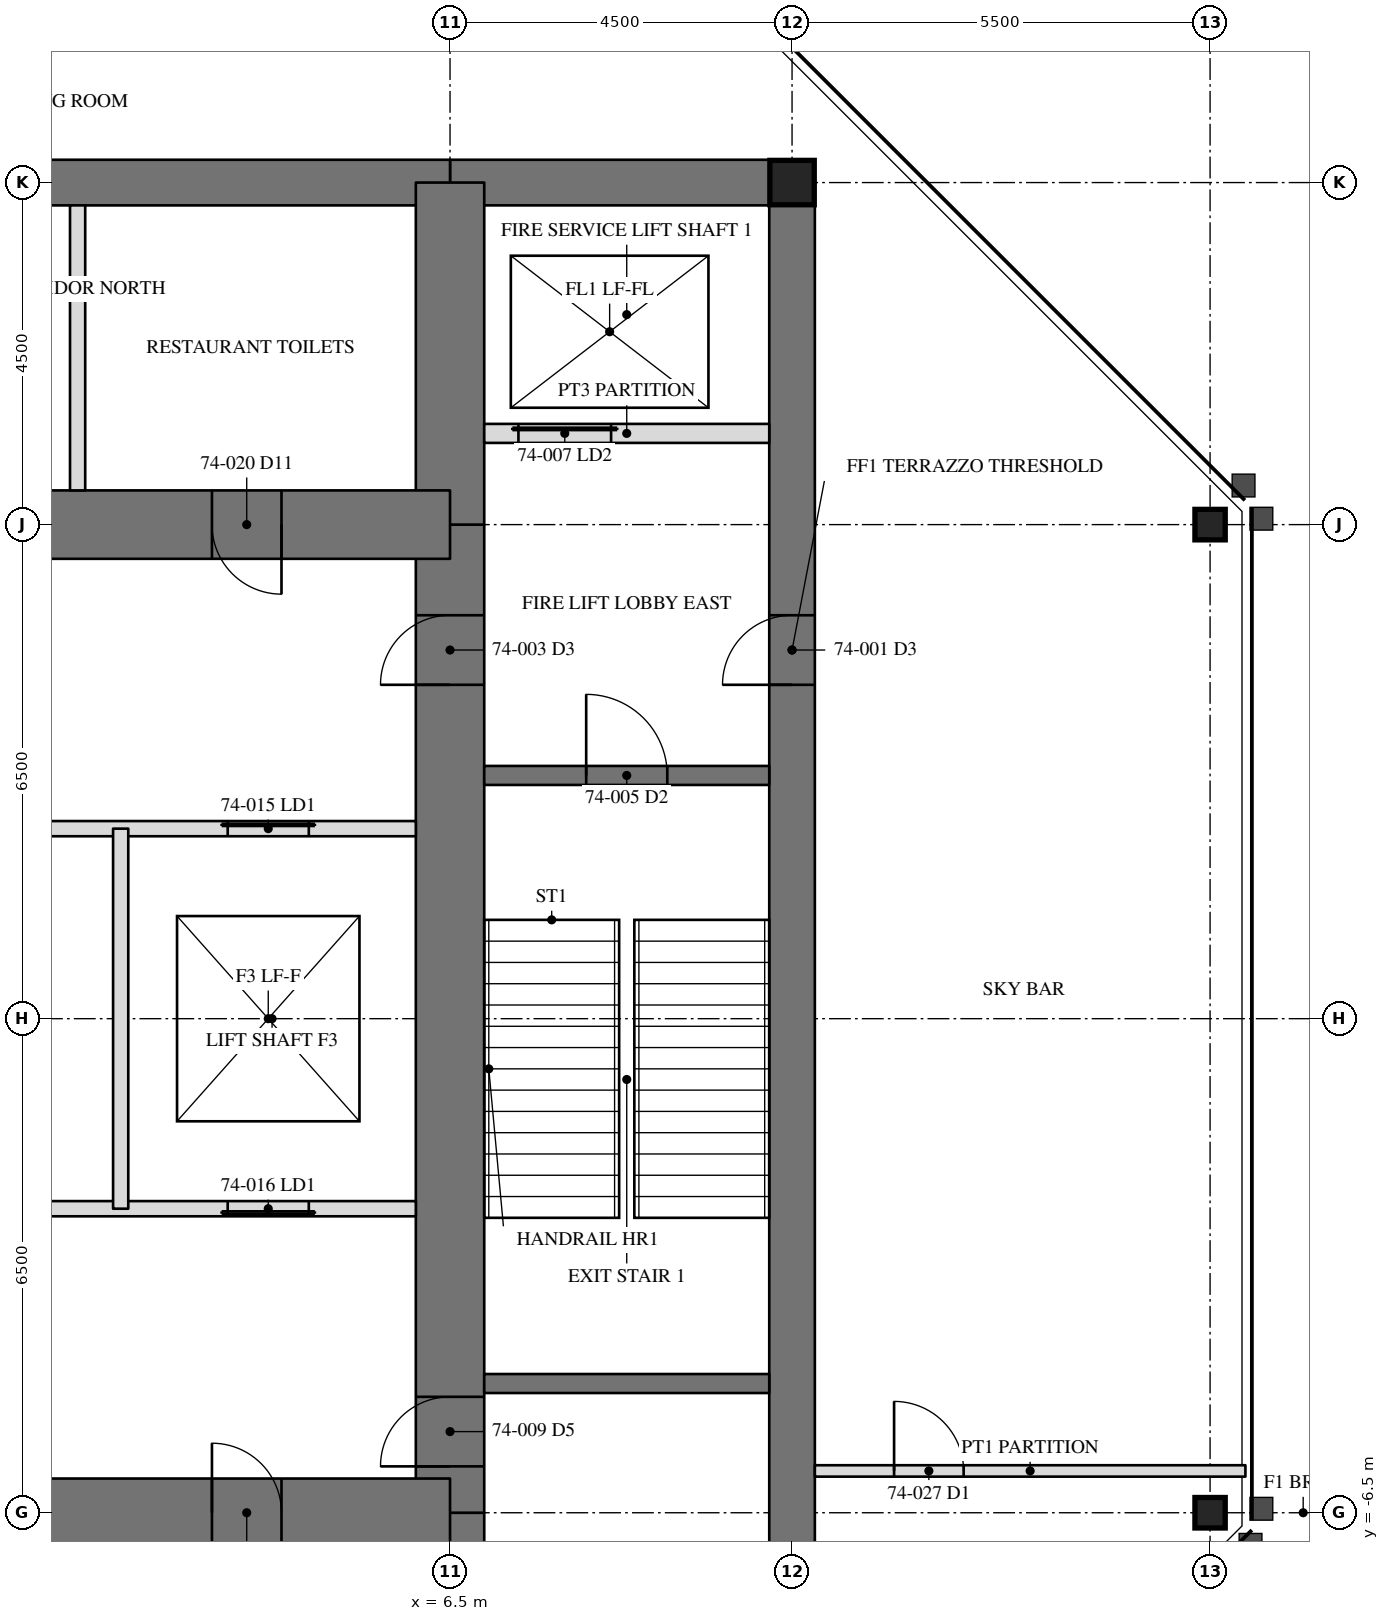
"""IFC4 building model, lengths in metres.
Left out: names, types, materials, properties, quantities, classifications, styles, units other than length and angle.
Written with IfcOpenShell. Run it as: python <this file> out.ifc"""

import sys

from ifc_helpers import new_model, si_unit, direction, frame, frame_2d, origin, origin_2d, place, context, subcontext, project, spatial, rectangle, hollow_rectangle, i_section, extrude, element, fill, save


model = new_model("IFC4")
c1 = context("Model", 3, precision=1e-05, world=origin(), true_north=direction((0.0, 1.0)))
c2 = subcontext(c1, "Body", "Model", "MODEL_VIEW")
j1 = project(units=[si_unit("LENGTHUNIT", "METRE"), si_unit("PLANEANGLEUNIT", "RADIAN")], contexts=[c1])
p1 = place(None, origin())
s1 = spatial("IfcSite", under=j1, at=p1, CompositionType="ELEMENT")
p2 = place(p1, origin())
s2 = spatial("IfcBuilding", under=s1, at=p2, CompositionType="ELEMENT")
p3 = place(p2, frame((0.0, 0.0, 299.2)))
s3 = spatial("IfcBuildingStorey", under=s2, at=p3, CompositionType="ELEMENT", Elevation=299.2)
for number, where, z_axis, x_axis in (
    (1, (16.5, -6.5, 0.0), (0.0, 0.0, 1.0), (0.0, 1.0, 0.0)),
    (2, (16.5, 6.5, 0.0), (0.0, 0.0, 1.0), (0.0, 1.0, 0.0)),
):
    element("IfcColumn", number, at=place(p3, frame(where, z_axis=z_axis, x_axis=x_axis)), inside=s3, PredefinedType="COLUMN", context=c2, shape_type="SweptSolid", body=[
        extrude(i_section(OverallWidth=0.401, OverallDepth=0.399, WebThickness=0.025, FlangeThickness=0.04, at=origin_2d()), origin(), (0.0, 0.0, 1.0), 5.0),
    ])
p4 = place(p3, frame((11.0, -11.0, 0.0), z_axis=(0.0, 0.0, 1.0), x_axis=(0.0, 1.0, 0.0)))
e3 = element("IfcWall", 3, at=p4, inside=s3, PredefinedType="SHEAR", context=c2, shape_type="SweptSolid", body=[
    extrude(rectangle(XDim=22.0, YDim=0.6, at=frame_2d((11.0, 0.0))), origin(), (0.0, 0.0, 1.0), 5.0),
])
p5 = place(p4, frame((15.393, 0.0, 0.0)))
e4 = element("IfcOpeningElement", 4, at=p5, cuts=e3, PredefinedType="OPENING", context=c2, shape_type="SweptSolid", body=[
    extrude(rectangle(XDim=0.915, YDim=2.134, at=frame_2d((0.458, 1.067))), frame((0.0, 0.31, 0.0), z_axis=(0.0, -1.0, 0.0), x_axis=(1.0, 0.0, 0.0)), (0.0, 0.0, 1.0), 0.62),
])
p6 = place(p3, frame((11.0, 11.0, 0.0), z_axis=(0.0, 0.0, 1.0), x_axis=(-1.0, 0.0, 0.0)))
e5 = element("IfcWall", 5, at=p6, inside=s3, PredefinedType="SHEAR", context=c2, shape_type="SweptSolid", body=[
    extrude(rectangle(XDim=4.5, YDim=0.6, at=frame_2d((2.25, 0.0))), origin(), (0.0, 0.0, 1.0), 5.0),
])
p7 = place(p3, frame((6.5, 11.0, 0.0), z_axis=(0.0, 0.0, 1.0), x_axis=(-1.0, 0.0, 0.0)))
e6 = element("IfcWall", 6, at=p7, inside=s3, PredefinedType="SHEAR", context=c2, shape_type="SweptSolid", body=[
    extrude(rectangle(XDim=13.0, YDim=0.6, at=frame_2d((6.5, 0.0))), origin(), (0.0, 0.0, 1.0), 5.0),
])
p8 = place(p7, frame((6.042, 0.0, 0.0)))
e7 = element("IfcOpeningElement", 7, at=p8, cuts=e6, PredefinedType="OPENING", context=c2, shape_type="SweptSolid", body=[
    extrude(rectangle(XDim=0.915, YDim=2.134, at=frame_2d((0.458, 1.067))), frame((0.0, 0.31, 0.0), z_axis=(0.0, -1.0, 0.0), x_axis=(1.0, 0.0, 0.0)), (0.0, 0.0, 1.0), 0.62),
])
p9 = place(p3, frame((6.5, -11.0, 0.0), z_axis=(0.0, 0.0, 1.0), x_axis=(0.0, 1.0, 0.0)))
e8 = element("IfcWall", 8, at=p9, inside=s3, PredefinedType="SHEAR", context=c2, shape_type="SweptSolid", body=[
    extrude(rectangle(XDim=4.5, YDim=0.9, at=frame_2d((2.25, 0.0))), origin(), (0.0, 0.0, 1.0), 5.0),
])
p10 = place(p3, frame((6.5, -6.5, 0.0), z_axis=(0.0, 0.0, 1.0), x_axis=(0.0, 1.0, 0.0)))
e9 = element("IfcWall", 9, at=p10, inside=s3, PredefinedType="SHEAR", context=c2, shape_type="SweptSolid", body=[
    extrude(rectangle(XDim=13.0, YDim=0.9, at=frame_2d((6.5, 0.0))), origin(), (0.0, 0.0, 1.0), 5.0),
])
p11 = place(p10, frame((10.893, 0.0, 0.0)))
e10 = element("IfcOpeningElement", 10, at=p11, cuts=e9, PredefinedType="OPENING", context=c2, shape_type="SweptSolid", body=[
    extrude(rectangle(XDim=0.915, YDim=2.134, at=frame_2d((0.458, 1.067))), frame((0.0, 0.46, 0.0), z_axis=(0.0, -1.0, 0.0), x_axis=(1.0, 0.0, 0.0)), (0.0, 0.0, 1.0), 0.92),
])
p12 = place(p10, frame((0.61, 0.0, 0.0)))
e11 = element("IfcOpeningElement", 11, at=p12, cuts=e9, PredefinedType="OPENING", context=c2, shape_type="SweptSolid", body=[
    extrude(rectangle(XDim=0.915, YDim=2.134, at=frame_2d((0.458, 1.067))), frame((0.0, 0.46, 0.0), z_axis=(0.0, -1.0, 0.0), x_axis=(1.0, 0.0, 0.0)), (0.0, 0.0, 1.0), 0.92),
])
p13 = place(p3, frame((6.5, 6.5, 0.0), z_axis=(0.0, 0.0, 1.0), x_axis=(0.0, 1.0, 0.0)))
e12 = element("IfcWall", 12, at=p13, inside=s3, PredefinedType="SHEAR", context=c2, shape_type="SweptSolid", body=[
    extrude(rectangle(XDim=4.5, YDim=0.9, at=frame_2d((2.25, 0.0))), origin(), (0.0, 0.0, 1.0), 5.0),
])
p14 = place(p3, frame((6.5, 6.5, 0.0), z_axis=(0.0, 0.0, 1.0), x_axis=(-1.0, 0.0, 0.0)))
e13 = element("IfcWall", 13, at=p14, inside=s3, PredefinedType="SHEAR", context=c2, shape_type="SweptSolid", body=[
    extrude(rectangle(XDim=13.0, YDim=0.9, at=frame_2d((6.5, 0.0))), origin(), (0.0, 0.0, 1.0), 5.0),
])
p15 = place(p14, frame((6.042, 0.0, 0.0)))
e14 = element("IfcOpeningElement", 14, at=p15, cuts=e13, PredefinedType="OPENING", context=c2, shape_type="SweptSolid", body=[
    extrude(rectangle(XDim=0.915, YDim=2.134, at=frame_2d((0.458, 1.067))), frame((0.0, 0.46, 0.0), z_axis=(0.0, -1.0, 0.0), x_axis=(1.0, 0.0, 0.0)), (0.0, 0.0, 1.0), 0.92),
])
p16 = place(p14, frame((9.867, 0.0, 0.0)))
e15 = element("IfcOpeningElement", 15, at=p16, cuts=e13, PredefinedType="OPENING", context=c2, shape_type="SweptSolid", body=[
    extrude(rectangle(XDim=0.915, YDim=2.134, at=frame_2d((0.458, 1.067))), frame((0.0, 0.46, 0.0), z_axis=(0.0, -1.0, 0.0), x_axis=(1.0, 0.0, 0.0)), (0.0, 0.0, 1.0), 0.92),
])
p17 = place(p14, frame((2.218, 0.0, 0.0)))
e16 = element("IfcOpeningElement", 16, at=p17, cuts=e13, PredefinedType="OPENING", context=c2, shape_type="SweptSolid", body=[
    extrude(rectangle(XDim=0.915, YDim=2.134, at=frame_2d((0.458, 1.067))), frame((0.0, 0.46, 0.0), z_axis=(0.0, -1.0, 0.0), x_axis=(1.0, 0.0, 0.0)), (0.0, 0.0, 1.0), 0.92),
])
p18 = place(p3, frame((-6.5, -6.5, 0.0), z_axis=(0.0, 0.0, 1.0), x_axis=(1.0, 0.0, 0.0)))
e17 = element("IfcWall", 17, at=p18, inside=s3, PredefinedType="SHEAR", context=c2, shape_type="SweptSolid", body=[
    extrude(rectangle(XDim=13.0, YDim=0.9, at=frame_2d((6.5, 0.0))), origin(), (0.0, 0.0, 1.0), 5.0),
])
p19 = place(p18, frame((6.042, 0.0, 0.0)))
e18 = element("IfcOpeningElement", 18, at=p19, cuts=e17, PredefinedType="OPENING", context=c2, shape_type="SweptSolid", body=[
    extrude(rectangle(XDim=0.915, YDim=2.134, at=frame_2d((0.458, 1.067))), frame((0.0, 0.46, 0.0), z_axis=(0.0, -1.0, 0.0), x_axis=(1.0, 0.0, 0.0)), (0.0, 0.0, 1.0), 0.92),
])
p20 = place(p18, frame((2.218, 0.0, 0.0)))
e19 = element("IfcOpeningElement", 19, at=p20, cuts=e17, PredefinedType="OPENING", context=c2, shape_type="SweptSolid", body=[
    extrude(rectangle(XDim=0.915, YDim=2.134, at=frame_2d((0.458, 1.067))), frame((0.0, 0.46, 0.0), z_axis=(0.0, -1.0, 0.0), x_axis=(1.0, 0.0, 0.0)), (0.0, 0.0, 1.0), 0.92),
])
p21 = place(p18, frame((9.867, 0.0, 0.0)))
e20 = element("IfcOpeningElement", 20, at=p21, cuts=e17, PredefinedType="OPENING", context=c2, shape_type="SweptSolid", body=[
    extrude(rectangle(XDim=0.915, YDim=2.134, at=frame_2d((0.458, 1.067))), frame((0.0, 0.46, 0.0), z_axis=(0.0, -1.0, 0.0), x_axis=(1.0, 0.0, 0.0)), (0.0, 0.0, 1.0), 0.92),
])
p22 = place(p3, frame((11.0, 11.0, 0.0), z_axis=(0.0, 0.0, 1.0), x_axis=(1.0, 0.0, 0.0)))
e21 = element("IfcColumn", 21, at=p22, inside=s3, PredefinedType="COLUMN", context=c2, shape_type="SweptSolid", body=[
    extrude(hollow_rectangle(XDim=0.584, YDim=0.584, WallThickness=0.051, at=origin_2d()), origin(), (0.0, 0.0, 1.0), 5.0),
])
p23 = place(p3, frame((6.95, -4.8, 0.0), z_axis=(0.0, 0.0, 1.0), x_axis=(1.0, 0.0, 0.0)))
e22 = element("IfcWall", 22, at=p23, inside=s3, PredefinedType="SOLIDWALL", context=c2, shape_type="SweptSolid", body=[
    extrude(rectangle(XDim=3.75, YDim=0.25, at=frame_2d((1.875, 0.0))), origin(), (0.0, 0.0, 1.0), 4.81),
])
p24 = place(p3, frame((6.95, 3.2, 0.0), z_axis=(0.0, 0.0, 1.0), x_axis=(1.0, 0.0, 0.0)))
e23 = element("IfcWall", 23, at=p24, inside=s3, PredefinedType="SOLIDWALL", context=c2, shape_type="SweptSolid", body=[
    extrude(rectangle(XDim=3.75, YDim=0.25, at=frame_2d((1.875, 0.0))), origin(), (0.0, 0.0, 1.0), 4.81),
])
p25 = place(p24, frame((1.342, 0.0, 0.0)))
e24 = element("IfcOpeningElement", 24, at=p25, cuts=e23, PredefinedType="OPENING", context=c2, shape_type="SweptSolid", body=[
    extrude(rectangle(XDim=1.067, YDim=2.134, at=frame_2d((0.533, 1.067))), frame((0.0, 0.135, 0.0), z_axis=(0.0, -1.0, 0.0), x_axis=(1.0, 0.0, 0.0)), (0.0, 0.0, 1.0), 0.27),
])
p26 = place(p3, frame((6.95, 7.7, 0.0), z_axis=(0.0, 0.0, 1.0), x_axis=(1.0, 0.0, 0.0)))
e25 = element("IfcWall", 25, at=p26, inside=s3, PredefinedType="PARTITIONING", context=c2, shape_type="SweptSolid", body=[
    extrude(rectangle(XDim=3.75, YDim=0.25, at=frame_2d((1.875, 0.0))), origin(), (0.0, 0.0, 1.0), 4.81),
])
p27 = place(p26, frame((0.45, 0.0, 0.0)))
e26 = element("IfcOpeningElement", 26, at=p27, cuts=e25, PredefinedType="OPENING", context=c2, shape_type="SweptSolid", body=[
    extrude(rectangle(XDim=1.219, YDim=2.134, at=frame_2d((0.609, 1.067))), frame((0.0, 0.135, 0.0), z_axis=(0.0, -1.0, 0.0), x_axis=(1.0, 0.0, 0.0)), (0.0, 0.0, 1.0), 0.27),
])
p28 = place(p3, frame((-6.05, 2.5, 0.0), z_axis=(0.0, 0.0, 1.0), x_axis=(1.0, 0.0, 0.0)))
e27 = element("IfcWall", 27, at=p28, inside=s3, PredefinedType="PARTITIONING", context=c2, shape_type="SweptSolid", body=[
    extrude(rectangle(XDim=12.1, YDim=0.2, at=frame_2d((6.05, 0.0))), origin(), (0.0, 0.0, 1.0), 4.81),
])
p29 = place(p28, frame((1.408, 0.0, 0.0)))
e28 = element("IfcOpeningElement", 28, at=p29, cuts=e27, PredefinedType="OPENING", context=c2, shape_type="SweptSolid", body=[
    extrude(rectangle(XDim=1.067, YDim=2.134, at=frame_2d((0.533, 1.067))), frame((0.0, 0.11, 0.0), z_axis=(0.0, -1.0, 0.0), x_axis=(1.0, 0.0, 0.0)), (0.0, 0.0, 1.0), 0.22),
])
p30 = place(p28, frame((5.517, 0.0, 0.0)))
e29 = element("IfcOpeningElement", 29, at=p30, cuts=e27, PredefinedType="OPENING", context=c2, shape_type="SweptSolid", body=[
    extrude(rectangle(XDim=1.067, YDim=2.134, at=frame_2d((0.533, 1.067))), frame((0.0, 0.11, 0.0), z_axis=(0.0, -1.0, 0.0), x_axis=(1.0, 0.0, 0.0)), (0.0, 0.0, 1.0), 0.22),
])
p31 = place(p28, frame((9.625, 0.0, 0.0)))
e30 = element("IfcOpeningElement", 30, at=p31, cuts=e27, PredefinedType="OPENING", context=c2, shape_type="SweptSolid", body=[
    extrude(rectangle(XDim=1.067, YDim=2.134, at=frame_2d((0.533, 1.067))), frame((0.0, 0.11, 0.0), z_axis=(0.0, -1.0, 0.0), x_axis=(1.0, 0.0, 0.0)), (0.0, 0.0, 1.0), 0.22),
])
p32 = place(p3, frame((6.05, -2.5, 0.0), z_axis=(0.0, 0.0, 1.0), x_axis=(-1.0, 0.0, 0.0)))
e31 = element("IfcWall", 31, at=p32, inside=s3, PredefinedType="PARTITIONING", context=c2, shape_type="SweptSolid", body=[
    extrude(rectangle(XDim=12.1, YDim=0.2, at=frame_2d((6.05, 0.0))), origin(), (0.0, 0.0, 1.0), 4.81),
])
p33 = place(p32, frame((9.625, 0.0, 0.0)))
e32 = element("IfcOpeningElement", 32, at=p33, cuts=e31, PredefinedType="OPENING", context=c2, shape_type="SweptSolid", body=[
    extrude(rectangle(XDim=1.067, YDim=2.134, at=frame_2d((0.533, 1.067))), frame((0.0, 0.11, 0.0), z_axis=(0.0, -1.0, 0.0), x_axis=(1.0, 0.0, 0.0)), (0.0, 0.0, 1.0), 0.22),
])
p34 = place(p32, frame((5.517, 0.0, 0.0)))
e33 = element("IfcOpeningElement", 33, at=p34, cuts=e31, PredefinedType="OPENING", context=c2, shape_type="SweptSolid", body=[
    extrude(rectangle(XDim=1.067, YDim=2.134, at=frame_2d((0.533, 1.067))), frame((0.0, 0.11, 0.0), z_axis=(0.0, -1.0, 0.0), x_axis=(1.0, 0.0, 0.0)), (0.0, 0.0, 1.0), 0.22),
])
p35 = place(p32, frame((1.408, 0.0, 0.0)))
e34 = element("IfcOpeningElement", 34, at=p35, cuts=e31, PredefinedType="OPENING", context=c2, shape_type="SweptSolid", body=[
    extrude(rectangle(XDim=1.067, YDim=2.134, at=frame_2d((0.533, 1.067))), frame((0.0, 0.11, 0.0), z_axis=(0.0, -1.0, 0.0), x_axis=(1.0, 0.0, 0.0)), (0.0, 0.0, 1.0), 0.22),
])
p36 = place(p3, frame((2.167, -2.5, 0.0), z_axis=(0.0, 0.0, 1.0), x_axis=(0.0, 1.0, 0.0)))
e35 = element("IfcWall", 35, at=p36, inside=s3, PredefinedType="PARTITIONING", context=c2, shape_type="SweptSolid", body=[
    extrude(rectangle(XDim=5.0, YDim=0.2, at=frame_2d((2.5, 0.0))), origin(), (0.0, 0.0, 1.0), 4.81),
])
p37 = place(p3, frame((1.6, 6.95, 0.0), z_axis=(0.0, 0.0, 1.0), x_axis=(0.0, 1.0, 0.0)))
e36 = element("IfcWall", 36, at=p37, inside=s3, PredefinedType="PARTITIONING", context=c2, shape_type="SweptSolid", body=[
    extrude(rectangle(XDim=3.75, YDim=0.2, at=frame_2d((1.875, 0.0))), origin(), (0.0, 0.0, 1.0), 4.81),
])
p38 = place(p3, frame((11.3, -5.95, 0.0), z_axis=(0.0, 0.0, 1.0), x_axis=(1.0, 0.0, 0.0)))
e37 = element("IfcWall", 37, at=p38, inside=s3, PredefinedType="PARTITIONING", context=c2, shape_type="SweptSolid", body=[
    extrude(rectangle(XDim=5.665, YDim=0.15, at=frame_2d((2.833, 0.0))), origin(), (0.0, 0.0, 1.0), 4.81),
])
p39 = place(p38, frame((1.042, 0.0, 0.0)))
e38 = element("IfcOpeningElement", 38, at=p39, cuts=e37, PredefinedType="OPENING", context=c2, shape_type="SweptSolid", body=[
    extrude(rectangle(XDim=0.915, YDim=2.134, at=frame_2d((0.458, 1.067))), frame((0.0, 0.085, 0.0), z_axis=(0.0, -1.0, 0.0), x_axis=(1.0, 0.0, 0.0)), (0.0, 0.0, 1.0), 0.17),
])
p40 = place(p5, origin())
e39 = element("IfcDoor", 39, at=p40, inside=s3, OperationType="SINGLE_SWING_RIGHT", PredefinedType="DOOR", context=c2, shape_type="SweptSolid", body=[
    extrude(rectangle(XDim=0.915, YDim=2.134, at=frame_2d((0.458, 1.067))), frame((0.0, -0.225, 0.0), z_axis=(0.0, -1.0, 0.0), x_axis=(1.0, 0.0, 0.0)), (0.0, 0.0, 1.0), 0.05),
])
fill(e4, e39)
p41 = place(p11, origin())
e40 = element("IfcDoor", 40, at=p41, inside=s3, OperationType="SINGLE_SWING_RIGHT", PredefinedType="DOOR", context=c2, shape_type="SweptSolid", body=[
    extrude(rectangle(XDim=0.915, YDim=2.134, at=frame_2d((0.458, 1.067))), frame((0.0, -0.375, 0.0), z_axis=(0.0, -1.0, 0.0), x_axis=(1.0, 0.0, 0.0)), (0.0, 0.0, 1.0), 0.05),
])
fill(e10, e40)
p42 = place(p25, origin())
e41 = element("IfcDoor", 41, at=p42, inside=s3, OperationType="SINGLE_SWING_LEFT", PredefinedType="DOOR", context=c2, shape_type="SweptSolid", body=[
    extrude(rectangle(XDim=1.067, YDim=2.134, at=frame_2d((0.533, 1.067))), frame((0.0, 0.025, 0.0), z_axis=(0.0, -1.0, 0.0), x_axis=(1.0, 0.0, 0.0)), (0.0, 0.0, 1.0), 0.05),
])
fill(e24, e41)
p43 = place(p27, origin())
e42 = element("IfcDoor", 42, at=p43, inside=s3, OperationType="SLIDING_TO_LEFT", PredefinedType="DOOR", context=c2, shape_type="SweptSolid", body=[
    extrude(rectangle(XDim=1.219, YDim=2.134, at=frame_2d((0.609, 1.067))), frame((0.0, 0.025, 0.0), z_axis=(0.0, -1.0, 0.0), x_axis=(1.0, 0.0, 0.0)), (0.0, 0.0, 1.0), 0.05),
])
fill(e26, e42)
p44 = place(p12, origin())
e43 = element("IfcDoor", 43, at=p44, inside=s3, OperationType="SINGLE_SWING_RIGHT", PredefinedType="DOOR", context=c2, shape_type="SweptSolid", body=[
    extrude(rectangle(XDim=0.915, YDim=2.134, at=frame_2d((0.458, 1.067))), frame((0.0, -0.375, 0.0), z_axis=(0.0, -1.0, 0.0), x_axis=(1.0, 0.0, 0.0)), (0.0, 0.0, 1.0), 0.05),
])
fill(e11, e43)
p45 = place(p31, origin())
e44 = element("IfcDoor", 44, at=p45, inside=s3, OperationType="SLIDING_TO_LEFT", PredefinedType="DOOR", context=c2, shape_type="SweptSolid", body=[
    extrude(rectangle(XDim=1.067, YDim=2.134, at=frame_2d((0.533, 1.067))), frame((0.0, 0.025, 0.0), z_axis=(0.0, -1.0, 0.0), x_axis=(1.0, 0.0, 0.0)), (0.0, 0.0, 1.0), 0.05),
])
fill(e30, e44)
p46 = place(p35, origin())
e45 = element("IfcDoor", 45, at=p46, inside=s3, OperationType="SLIDING_TO_LEFT", PredefinedType="DOOR", context=c2, shape_type="SweptSolid", body=[
    extrude(rectangle(XDim=1.067, YDim=2.134, at=frame_2d((0.533, 1.067))), frame((0.0, 0.025, 0.0), z_axis=(0.0, -1.0, 0.0), x_axis=(1.0, 0.0, 0.0)), (0.0, 0.0, 1.0), 0.05),
])
fill(e34, e45)
p47 = place(p17, origin())
e46 = element("IfcDoor", 46, at=p47, inside=s3, OperationType="SINGLE_SWING_LEFT", PredefinedType="DOOR", context=c2, shape_type="SweptSolid", body=[
    extrude(rectangle(XDim=0.915, YDim=2.134, at=frame_2d((0.458, 1.067))), frame((0.0, -0.375, 0.0), z_axis=(0.0, -1.0, 0.0), x_axis=(1.0, 0.0, 0.0)), (0.0, 0.0, 1.0), 0.05),
])
fill(e16, e46)
p48 = place(p39, origin())
e47 = element("IfcDoor", 47, at=p48, inside=s3, OperationType="SINGLE_SWING_LEFT", PredefinedType="DOOR", context=c2, shape_type="SweptSolid", body=[
    extrude(rectangle(XDim=0.915, YDim=2.134, at=frame_2d((0.458, 1.067))), frame((0.0, 0.025, 0.0), z_axis=(0.0, -1.0, 0.0), x_axis=(1.0, 0.0, 0.0)), (0.0, 0.0, 1.0), 0.05),
])
fill(e38, e47)
save(model, sys.argv[1])
